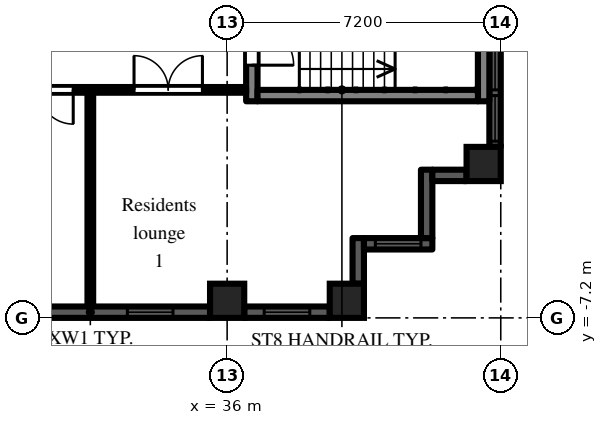
"""IFC4 building model, lengths in metres.
Left out: names, types, materials, properties, quantities, classifications, styles, units other than length and angle.
Written with IfcOpenShell. Run it as: python <this file> out.ifc"""

import sys

from ifc_helpers import new_model, si_unit, direction, frame, frame_2d, origin, origin_2d, place, context, subcontext, project, spatial, rectangle, extrude, element, fill, save


model = new_model("IFC4")
c1 = context("Model", 3, precision=1e-05, world=origin(), true_north=direction((0.0, 1.0)))
c2 = subcontext(c1, "Body", "Model", "MODEL_VIEW")
j1 = project(units=[si_unit("LENGTHUNIT", "METRE"), si_unit("PLANEANGLEUNIT", "RADIAN")], contexts=[c1])
p1 = place(None, origin())
s1 = spatial("IfcSite", under=j1, at=p1, CompositionType="ELEMENT")
p2 = place(p1, origin())
s2 = spatial("IfcBuilding", under=s1, at=p2, CompositionType="ELEMENT")
p3 = place(p2, frame((0.0, 0.0, 75.9)))
s3 = spatial("IfcBuildingStorey", under=s2, at=p3, CompositionType="ELEMENT", Elevation=75.9)
for number, where, z_axis, x_axis in (
    (1, (36.0, -6.75, 0.0), (0.0, 0.0, 1.0), (1.0, 0.0, 0.0)),
    (2, (39.15, -6.75, 0.0), (0.0, 0.0, 1.0), (1.0, 0.0, 0.0)),
    (3, (42.75, -3.15, 0.0), (0.0, 0.0, 1.0), (1.0, 0.0, 0.0)),
):
    element("IfcColumn", number, at=place(p3, frame(where, z_axis=z_axis, x_axis=x_axis)), inside=s3, PredefinedType="COLUMN", context=c2, shape_type="SweptSolid", body=[
        extrude(rectangle(XDim=0.9, YDim=0.9, at=origin_2d()), origin(), (0.0, 0.0, 1.0), 3.0),
    ])
p4 = place(p3, frame((29.25, -7.05, 0.0), z_axis=(0.0, 0.0, 1.0), x_axis=(1.0, 0.0, 0.0)))
e4 = element("IfcWall", 4, at=p4, inside=s3, PredefinedType="SOLIDWALL", context=c2, shape_type="SweptSolid", body=[
    extrude(rectangle(XDim=6.3, YDim=0.3, at=frame_2d((3.15, 0.0))), origin(), (0.0, 0.0, 1.0), 2.1),
])
p5 = place(p4, frame((4.125, 0.0, 0.2)))
e5 = element("IfcOpeningElement", 5, at=p5, cuts=e4, PredefinedType="OPENING", context=c2, shape_type="SweptSolid", body=[
    extrude(rectangle(XDim=1.2, YDim=1.85, at=frame_2d((0.6, 0.925))), frame((0.0, 0.16, 0.0), z_axis=(0.0, -1.0, 0.0), x_axis=(1.0, 0.0, 0.0)), (0.0, 0.0, 1.0), 0.32),
])
p6 = place(p3, frame((36.45, -7.05, 0.0), z_axis=(0.0, 0.0, 1.0), x_axis=(1.0, 0.0, 0.0)))
e6 = element("IfcWall", 6, at=p6, inside=s3, PredefinedType="SOLIDWALL", context=c2, shape_type="SweptSolid", body=[
    extrude(rectangle(XDim=2.25, YDim=0.3, at=frame_2d((1.125, 0.0))), origin(), (0.0, 0.0, 1.0), 2.1),
])
p7 = place(p6, frame((0.525, 0.0, 0.2)))
e7 = element("IfcOpeningElement", 7, at=p7, cuts=e6, PredefinedType="OPENING", context=c2, shape_type="SweptSolid", body=[
    extrude(rectangle(XDim=1.2, YDim=1.85, at=frame_2d((0.6, 0.925))), frame((0.0, 0.16, 0.0), z_axis=(0.0, -1.0, 0.0), x_axis=(1.0, 0.0, 0.0)), (0.0, 0.0, 1.0), 0.32),
])
p8 = place(p3, frame((39.45, -6.3, 0.0), z_axis=(0.0, 0.0, 1.0), x_axis=(0.0, 1.0, 0.0)))
e8 = element("IfcWall", 8, at=p8, inside=s3, PredefinedType="SOLIDWALL", context=c2, shape_type="SweptSolid", body=[
    extrude(rectangle(XDim=1.2, YDim=0.3, at=frame_2d((0.6, 0.0))), origin(), (0.0, 0.0, 1.0), 2.575),
])
p9 = place(p3, frame((39.6, -5.25, 0.0), z_axis=(0.0, 0.0, 1.0), x_axis=(1.0, 0.0, 0.0)))
e9 = element("IfcWall", 9, at=p9, inside=s3, PredefinedType="SOLIDWALL", context=c2, shape_type="SweptSolid", body=[
    extrude(rectangle(XDim=1.8, YDim=0.3, at=frame_2d((0.9, 0.0))), origin(), (0.0, 0.0, 1.0), 2.575),
])
p10 = place(p9, frame((0.3, 0.0, 0.2)))
e10 = element("IfcOpeningElement", 10, at=p10, cuts=e9, PredefinedType="OPENING", context=c2, shape_type="SweptSolid", body=[
    extrude(rectangle(XDim=1.2, YDim=1.85, at=frame_2d((0.6, 0.925))), frame((0.0, 0.16, 0.0), z_axis=(0.0, -1.0, 0.0), x_axis=(1.0, 0.0, 0.0)), (0.0, 0.0, 1.0), 0.32),
])
p11 = place(p3, frame((41.25, -5.1, 0.0), z_axis=(0.0, 0.0, 1.0), x_axis=(0.0, 1.0, 0.0)))
e11 = element("IfcWall", 11, at=p11, inside=s3, PredefinedType="SOLIDWALL", context=c2, shape_type="SweptSolid", body=[
    extrude(rectangle(XDim=1.8, YDim=0.3, at=frame_2d((0.9, 0.0))), origin(), (0.0, 0.0, 1.0), 2.575),
])
p12 = place(p3, frame((41.4, -3.45, 0.0), z_axis=(0.0, 0.0, 1.0), x_axis=(1.0, 0.0, 0.0)))
e12 = element("IfcWall", 12, at=p12, inside=s3, PredefinedType="SOLIDWALL", context=c2, shape_type="SweptSolid", body=[
    extrude(rectangle(XDim=0.9, YDim=0.3, at=frame_2d((0.45, 0.0))), origin(), (0.0, 0.0, 1.0), 2.575),
])
p13 = place(p3, frame((43.05, -2.7, 0.0), z_axis=(0.0, 0.0, 1.0), x_axis=(0.0, 1.0, 0.0)))
e13 = element("IfcWall", 13, at=p13, inside=s3, PredefinedType="SOLIDWALL", context=c2, shape_type="SweptSolid", body=[
    extrude(rectangle(XDim=5.4, YDim=0.3, at=frame_2d((2.7, 0.0))), origin(), (0.0, 0.0, 1.0), 2.1),
])
p14 = place(p13, frame((1.5, 0.0, 0.2)))
e14 = element("IfcOpeningElement", 14, at=p14, cuts=e13, PredefinedType="OPENING", context=c2, shape_type="SweptSolid", body=[
    extrude(rectangle(XDim=2.4, YDim=1.85, at=frame_2d((1.2, 0.925))), frame((0.0, 0.16, 0.0), z_axis=(0.0, -1.0, 0.0), x_axis=(1.0, 0.0, 0.0)), (0.0, 0.0, 1.0), 0.32),
])
p15 = place(p13, frame((0.15, 0.0, 0.2)))
e15 = element("IfcOpeningElement", 15, at=p15, cuts=e13, PredefinedType="OPENING", context=c2, shape_type="SweptSolid", body=[
    extrude(rectangle(XDim=1.2, YDim=1.85, at=frame_2d((0.6, 0.925))), frame((0.0, 0.16, 0.0), z_axis=(0.0, -1.0, 0.0), x_axis=(1.0, 0.0, 0.0)), (0.0, 0.0, 1.0), 0.32),
])
p16 = place(p13, frame((4.05, 0.0, 0.2)))
e16 = element("IfcOpeningElement", 16, at=p16, cuts=e13, PredefinedType="OPENING", context=c2, shape_type="SweptSolid", body=[
    extrude(rectangle(XDim=1.2, YDim=1.85, at=frame_2d((0.6, 0.925))), frame((0.0, 0.16, 0.0), z_axis=(0.0, -1.0, 0.0), x_axis=(1.0, 0.0, 0.0)), (0.0, 0.0, 1.0), 0.32),
])
p17 = place(p3, frame((36.65, -1.5, 0.0), z_axis=(0.0, 0.0, 1.0), x_axis=(0.0, 1.0, 0.0)))
e17 = element("IfcWall", 17, at=p17, inside=s3, PredefinedType="SHEAR", context=c2, shape_type="SweptSolid", body=[
    extrude(rectangle(XDim=3.0, YDim=0.3, at=frame_2d((1.5, 0.0))), origin(), (0.0, 0.0, 1.0), 2.575),
])
p18 = place(p17, frame((0.95, 0.0, 0.0)))
e18 = element("IfcOpeningElement", 18, at=p18, cuts=e17, PredefinedType="OPENING", context=c2, shape_type="SweptSolid", body=[
    extrude(rectangle(XDim=1.1, YDim=2.1, at=frame_2d((0.55, 1.05))), frame((0.0, 0.16, 0.0), z_axis=(0.0, -1.0, 0.0), x_axis=(1.0, 0.0, 0.0)), (0.0, 0.0, 1.0), 0.32),
])
p19 = place(p3, frame((42.75, -1.5, 0.0), z_axis=(0.0, 0.0, 1.0), x_axis=(0.0, 1.0, 0.0)))
e19 = element("IfcWall", 19, at=p19, inside=s3, PredefinedType="SHEAR", context=c2, shape_type="SweptSolid", body=[
    extrude(rectangle(XDim=3.0, YDim=0.3, at=frame_2d((1.5, 0.0))), origin(), (0.0, 0.0, 1.0), 2.575),
])
p20 = place(p3, frame((36.8, -1.35, 0.0), z_axis=(0.0, 0.0, 1.0), x_axis=(1.0, 0.0, 0.0)))
e20 = element("IfcWall", 20, at=p20, inside=s3, PredefinedType="SHEAR", context=c2, shape_type="SweptSolid", body=[
    extrude(rectangle(XDim=5.8, YDim=0.3, at=frame_2d((2.9, 0.0))), origin(), (0.0, 0.0, 1.0), 2.575),
])
p21 = place(p3, frame((21.6, -1.2, 0.0), z_axis=(0.0, 0.0, 1.0), x_axis=(1.0, 0.0, 0.0)))
e21 = element("IfcWall", 21, at=p21, inside=s3, PredefinedType="PARTITIONING", context=c2, shape_type="SweptSolid", body=[
    extrude(rectangle(XDim=14.9, YDim=0.15, at=frame_2d((7.45, 0.0))), origin(), (0.0, 0.0, 1.0), 2.575),
])
p22 = place(p21, frame((0.45, 0.0, 0.0)))
e22 = element("IfcOpeningElement", 22, at=p22, cuts=e21, PredefinedType="OPENING", context=c2, shape_type="SweptSolid", body=[
    extrude(rectangle(XDim=0.9, YDim=2.1, at=frame_2d((0.45, 1.05))), frame((0.0, 0.085, 0.0), z_axis=(0.0, -1.0, 0.0), x_axis=(1.0, 0.0, 0.0)), (0.0, 0.0, 1.0), 0.17),
])
p23 = place(p21, frame((2.25, 0.0, 0.0)))
e23 = element("IfcOpeningElement", 23, at=p23, cuts=e21, PredefinedType="OPENING", context=c2, shape_type="SweptSolid", body=[
    extrude(rectangle(XDim=0.9, YDim=2.1, at=frame_2d((0.45, 1.05))), frame((0.0, 0.085, 0.0), z_axis=(0.0, -1.0, 0.0), x_axis=(1.0, 0.0, 0.0)), (0.0, 0.0, 1.0), 0.17),
])
p24 = place(p21, frame((4.95, 0.0, 0.0)))
e24 = element("IfcOpeningElement", 24, at=p24, cuts=e21, PredefinedType="OPENING", context=c2, shape_type="SweptSolid", body=[
    extrude(rectangle(XDim=0.9, YDim=2.1, at=frame_2d((0.45, 1.05))), frame((0.0, 0.085, 0.0), z_axis=(0.0, -1.0, 0.0), x_axis=(1.0, 0.0, 0.0)), (0.0, 0.0, 1.0), 0.17),
])
p25 = place(p21, frame((7.65, 0.0, 0.0)))
e25 = element("IfcOpeningElement", 25, at=p25, cuts=e21, PredefinedType="OPENING", context=c2, shape_type="SweptSolid", body=[
    extrude(rectangle(XDim=0.9, YDim=2.1, at=frame_2d((0.45, 1.05))), frame((0.0, 0.085, 0.0), z_axis=(0.0, -1.0, 0.0), x_axis=(1.0, 0.0, 0.0)), (0.0, 0.0, 1.0), 0.17),
])
p26 = place(p21, frame((9.45, 0.0, 0.0)))
e26 = element("IfcOpeningElement", 26, at=p26, cuts=e21, PredefinedType="OPENING", context=c2, shape_type="SweptSolid", body=[
    extrude(rectangle(XDim=0.9, YDim=2.1, at=frame_2d((0.45, 1.05))), frame((0.0, 0.085, 0.0), z_axis=(0.0, -1.0, 0.0), x_axis=(1.0, 0.0, 0.0)), (0.0, 0.0, 1.0), 0.17),
])
p27 = place(p21, frame((11.95, 0.0, 0.0)))
e27 = element("IfcOpeningElement", 27, at=p27, cuts=e21, PredefinedType="OPENING", context=c2, shape_type="SweptSolid", body=[
    extrude(rectangle(XDim=1.8, YDim=2.1, at=frame_2d((0.9, 1.05))), frame((0.0, 0.085, 0.0), z_axis=(0.0, -1.0, 0.0), x_axis=(1.0, 0.0, 0.0)), (0.0, 0.0, 1.0), 0.17),
])
p28 = place(p3, frame((32.4, -6.9, 0.0), z_axis=(0.0, 0.0, 1.0), x_axis=(0.0, 1.0, 0.0)))
e28 = element("IfcWall", 28, at=p28, inside=s3, PredefinedType="PARTITIONING", context=c2, shape_type="SweptSolid", body=[
    extrude(rectangle(XDim=5.625, YDim=0.15, at=frame_2d((2.812, 0.0))), origin(), (0.0, 0.0, 1.0), 2.575),
])
p29 = place(p5, origin())
e29 = element("IfcWindow", 29, at=p29, inside=s3, PartitioningType="SINGLE_PANEL", PredefinedType="WINDOW", context=c2, shape_type="SweptSolid", body=[
    extrude(rectangle(XDim=1.2, YDim=1.85, at=frame_2d((0.6, 0.925))), frame((0.0, 0.03, 0.0), z_axis=(0.0, -1.0, 0.0), x_axis=(1.0, 0.0, 0.0)), (0.0, 0.0, 1.0), 0.06),
])
fill(e5, e29)
p30 = place(p7, origin())
e30 = element("IfcWindow", 30, at=p30, inside=s3, PartitioningType="SINGLE_PANEL", PredefinedType="WINDOW", context=c2, shape_type="SweptSolid", body=[
    extrude(rectangle(XDim=1.2, YDim=1.85, at=frame_2d((0.6, 0.925))), frame((0.0, 0.03, 0.0), z_axis=(0.0, -1.0, 0.0), x_axis=(1.0, 0.0, 0.0)), (0.0, 0.0, 1.0), 0.06),
])
fill(e7, e30)
p31 = place(p10, origin())
e31 = element("IfcWindow", 31, at=p31, inside=s3, PartitioningType="SINGLE_PANEL", PredefinedType="WINDOW", context=c2, shape_type="SweptSolid", body=[
    extrude(rectangle(XDim=1.2, YDim=1.85, at=frame_2d((0.6, 0.925))), frame((0.0, 0.03, 0.0), z_axis=(0.0, -1.0, 0.0), x_axis=(1.0, 0.0, 0.0)), (0.0, 0.0, 1.0), 0.06),
])
fill(e10, e31)
p32 = place(p14, origin())
e32 = element("IfcWindow", 32, at=p32, inside=s3, PartitioningType="SINGLE_PANEL", PredefinedType="WINDOW", context=c2, shape_type="SweptSolid", body=[
    extrude(rectangle(XDim=2.4, YDim=1.85, at=frame_2d((1.2, 0.925))), frame((0.0, 0.03, 0.0), z_axis=(0.0, -1.0, 0.0), x_axis=(1.0, 0.0, 0.0)), (0.0, 0.0, 1.0), 0.06),
])
fill(e14, e32)
p33 = place(p15, origin())
e33 = element("IfcWindow", 33, at=p33, inside=s3, PartitioningType="SINGLE_PANEL", PredefinedType="WINDOW", context=c2, shape_type="SweptSolid", body=[
    extrude(rectangle(XDim=1.2, YDim=1.85, at=frame_2d((0.6, 0.925))), frame((0.0, 0.03, 0.0), z_axis=(0.0, -1.0, 0.0), x_axis=(1.0, 0.0, 0.0)), (0.0, 0.0, 1.0), 0.06),
])
fill(e15, e33)
p34 = place(p18, frame((1.1, 0.0, 0.0), z_axis=(0.0, 0.0, 1.0), x_axis=(-1.0, 0.0, 0.0)))
e34 = element("IfcDoor", 34, at=p34, inside=s3, OperationType="SINGLE_SWING_RIGHT", PredefinedType="DOOR", context=c2, shape_type="SweptSolid", body=[
    extrude(rectangle(XDim=1.1, YDim=2.1, at=frame_2d((0.55, 1.05))), frame((0.0, 0.025, 0.0), z_axis=(0.0, -1.0, 0.0), x_axis=(1.0, 0.0, 0.0)), (0.0, 0.0, 1.0), 0.05),
])
fill(e18, e34)
p35 = place(p26, frame((0.9, 0.0, 0.0), z_axis=(0.0, 0.0, 1.0), x_axis=(-1.0, 0.0, 0.0)))
e35 = element("IfcDoor", 35, at=p35, inside=s3, OperationType="SINGLE_SWING_LEFT", PredefinedType="DOOR", context=c2, shape_type="SweptSolid", body=[
    extrude(rectangle(XDim=0.9, YDim=2.1, at=frame_2d((0.45, 1.05))), frame((0.0, 0.025, 0.0), z_axis=(0.0, -1.0, 0.0), x_axis=(1.0, 0.0, 0.0)), (0.0, 0.0, 1.0), 0.05),
])
fill(e26, e35)
p36 = place(p27, origin())
e36 = element("IfcDoor", 36, at=p36, inside=s3, OperationType="DOUBLE_DOOR_DOUBLE_SWING", PredefinedType="DOOR", context=c2, shape_type="SweptSolid", body=[
    extrude(rectangle(XDim=1.8, YDim=2.1, at=frame_2d((0.9, 1.05))), frame((0.0, 0.025, 0.0), z_axis=(0.0, -1.0, 0.0), x_axis=(1.0, 0.0, 0.0)), (0.0, 0.0, 1.0), 0.05),
])
fill(e27, e36)
save(model, sys.argv[1])
